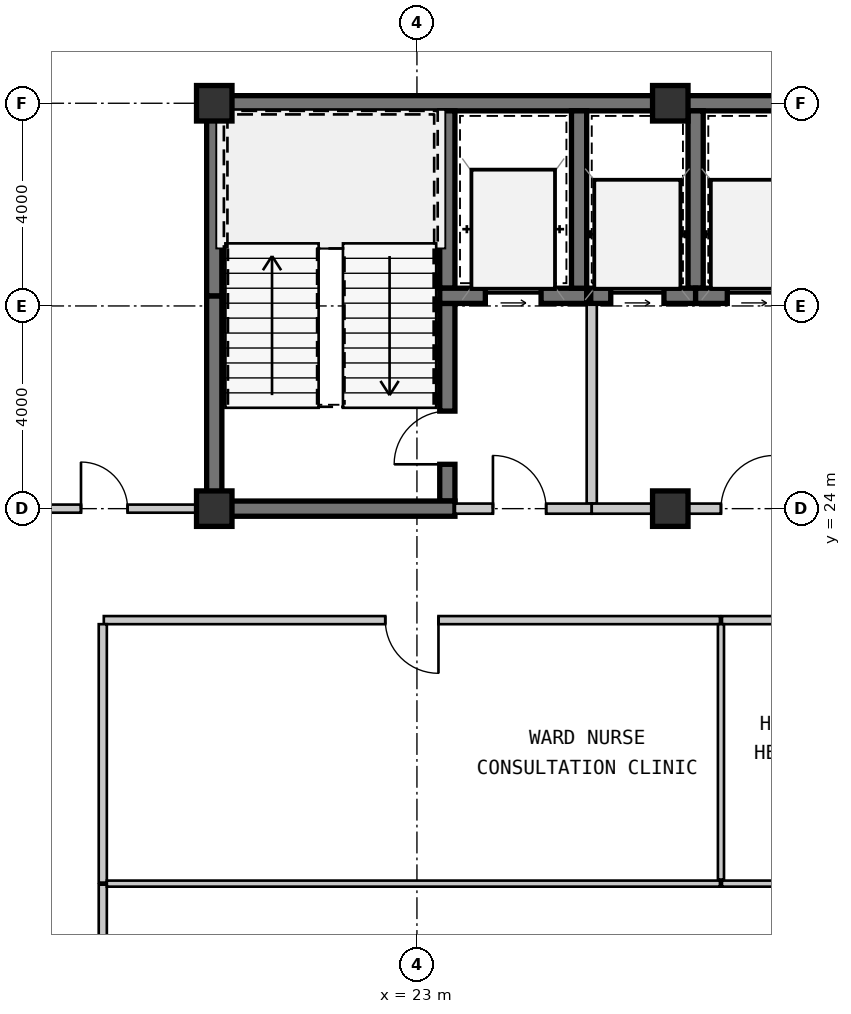
"""IFC4 building model, lengths in metres.
Left out: names, types, materials, properties, quantities, classifications, styles, units other than length and angle.
Written with IfcOpenShell. Run it as: python <this file> out.ifc"""

import sys

from ifc_helpers import new_model, si_unit, direction, frame, frame_2d, origin, origin_2d, place, context, subcontext, project, spatial, rectangle, extrude, source, transform, mapped, element, fill, save


model = new_model("IFC4")
c1 = context("Model", 3, precision=1e-05, world=origin(), true_north=direction((0.0, 1.0)))
c2 = subcontext(c1, "Body", "Model", "MODEL_VIEW")
j1 = project(units=[si_unit("LENGTHUNIT", "METRE"), si_unit("PLANEANGLEUNIT", "RADIAN")], contexts=[c1])
p1 = place(None, origin())
s1 = spatial("IfcSite", under=j1, at=p1, CompositionType="ELEMENT")
p2 = place(p1, origin())
s2 = spatial("IfcBuilding", under=s1, at=p2, CompositionType="ELEMENT")
p3 = place(p2, frame((0.0, 0.0, 87.15)))
s3 = spatial("IfcBuildingStorey", under=s2, at=p3, CompositionType="ELEMENT", Elevation=87.15)
m1 = source(origin(), c2, "Body", "SweptSolid", [
    extrude(rectangle(XDim=0.7, YDim=0.7, at=origin_2d()), origin(), (0.0, 0.0, 1.0), 3.15),
])
for number, where, z_axis, x_axis in (
    (1, (19.0, 24.0, 0.0), (0.0, 0.0, 1.0), (1.0, 0.0, 0.0)),
    (2, (28.0, 24.0, 0.0), (0.0, 0.0, 1.0), (1.0, 0.0, 0.0)),
    (3, (19.0, 32.0, 0.0), (0.0, 0.0, 1.0), (1.0, 0.0, 0.0)),
    (4, (28.0, 32.0, 0.0), (0.0, 0.0, 1.0), (1.0, 0.0, 0.0)),
):
    element("IfcColumn", number, at=place(p3, frame(where, z_axis=z_axis, x_axis=x_axis)), inside=s3, PredefinedType="COLUMN", context=c2, shape_type="MappedRepresentation", body=[
        mapped(m1, transform((0.0, 0.0, 0.0), scale=1.0)),
    ])
m2 = source(origin(), c2, "Body", "SweptSolid", [
    extrude(rectangle(XDim=9.15, YDim=0.3, at=frame_2d((4.575, 0.0))), origin(), (0.0, 0.0, 1.0), 2.93),
])
p4 = place(p3, frame((18.85, 32.0, 0.0), z_axis=(0.0, 0.0, 1.0), x_axis=(1.0, 0.0, 0.0)))
e5 = element("IfcWall", 5, at=p4, inside=s3, PredefinedType="SHEAR", context=c2, shape_type="MappedRepresentation", body=[
    mapped(m2, transform((0.0, 0.0, 0.0), scale=1.0)),
])
m3 = source(origin(), c2, "Body", "SweptSolid", [
    extrude(rectangle(XDim=11.2, YDim=0.3, at=frame_2d((5.6, 0.0))), origin(), (0.0, 0.0, 1.0), 2.93),
])
p5 = place(p3, frame((28.0, 32.0, 0.0), z_axis=(0.0, 0.0, 1.0), x_axis=(1.0, 0.0, 0.0)))
e6 = element("IfcWall", 6, at=p5, inside=s3, PredefinedType="SHEAR", context=c2, shape_type="MappedRepresentation", body=[
    mapped(m3, transform((0.0, 0.0, 0.0), scale=1.0)),
])
m4 = source(origin(), c2, "Body", "SweptSolid", [
    extrude(rectangle(XDim=4.05, YDim=0.3, at=frame_2d((2.025, 0.0))), origin(), (0.0, 0.0, 1.0), 2.93),
])
p6 = place(p3, frame((19.0, 24.15, 0.0), z_axis=(0.0, 0.0, 1.0), x_axis=(0.0, 1.0, 0.0)))
e7 = element("IfcWall", 7, at=p6, inside=s3, PredefinedType="SHEAR", context=c2, shape_type="MappedRepresentation", body=[
    mapped(m4, transform((0.0, 0.0, 0.0), scale=1.0)),
])
m5 = source(origin(), c2, "Body", "SweptSolid", [
    extrude(rectangle(XDim=3.65, YDim=0.3, at=frame_2d((1.825, 0.0))), origin(), (0.0, 0.0, 1.0), 2.93),
])
p7 = place(p3, frame((19.0, 28.2, 0.0), z_axis=(0.0, 0.0, 1.0), x_axis=(0.0, 1.0, 0.0)))
e8 = element("IfcWall", 8, at=p7, inside=s3, PredefinedType="SHEAR", context=c2, shape_type="MappedRepresentation", body=[
    mapped(m5, transform((0.0, 0.0, 0.0), scale=1.0)),
])
m6 = source(origin(), c2, "Body", "SweptSolid", [
    extrude(rectangle(XDim=3.5, YDim=0.3, at=frame_2d((1.75, 0.0))), origin(), (0.0, 0.0, 1.0), 2.93),
])
p8 = place(p3, frame((23.6, 28.35, 0.0), z_axis=(0.0, 0.0, 1.0), x_axis=(0.0, 1.0, 0.0)))
e9 = element("IfcWall", 9, at=p8, inside=s3, PredefinedType="SHEAR", context=c2, shape_type="MappedRepresentation", body=[
    mapped(m6, transform((0.0, 0.0, 0.0), scale=1.0)),
])
m7 = source(origin(), c2, "Body", "SweptSolid", [
    extrude(rectangle(XDim=3.9, YDim=0.3, at=frame_2d((1.95, 0.0))), origin(), (0.0, 0.0, 1.0), 2.93),
])
p9 = place(p3, frame((23.6, 24.15, 0.0), z_axis=(0.0, 0.0, 1.0), x_axis=(0.0, 1.0, 0.0)))
e10 = element("IfcWall", 10, at=p9, inside=s3, PredefinedType="SHEAR", context=c2, shape_type="MappedRepresentation", body=[
    mapped(m7, transform((0.0, 0.0, 0.0), scale=1.0)),
])
m8 = source(origin(), c2, "Body", "SweptSolid", [
    extrude(rectangle(XDim=1.05, YDim=2.1, at=frame_2d((0.525, 1.05))), frame((0.0, 0.16, 0.0), z_axis=(0.0, -1.0, 0.0), x_axis=(1.0, 0.0, 0.0)), (0.0, 0.0, 1.0), 0.32),
])
p10 = place(p9, frame((0.725, 0.0, 0.0)))
e11 = element("IfcOpeningElement", 11, at=p10, cuts=e10, PredefinedType="OPENING", context=c2, shape_type="MappedRepresentation", body=[
    mapped(m8, transform((0.0, 0.0, 0.0), scale=1.0)),
])
m9 = source(origin(), c2, "Body", "SweptSolid", [
    extrude(rectangle(XDim=4.9, YDim=0.3, at=frame_2d((2.45, 0.0))), origin(), (0.0, 0.0, 1.0), 2.93),
])
p11 = place(p3, frame((18.85, 24.0, 0.0), z_axis=(0.0, 0.0, 1.0), x_axis=(1.0, 0.0, 0.0)))
e12 = element("IfcWall", 12, at=p11, inside=s3, PredefinedType="SHEAR", context=c2, shape_type="MappedRepresentation", body=[
    mapped(m9, transform((0.0, 0.0, 0.0), scale=1.0)),
])
m10 = source(origin(), c2, "Body", "SweptSolid", [
    extrude(rectangle(XDim=2.9, YDim=0.3, at=frame_2d((1.45, 0.0))), origin(), (0.0, 0.0, 1.0), 2.93),
])
p12 = place(p3, frame((23.45, 28.2, 0.0), z_axis=(0.0, 0.0, 1.0), x_axis=(1.0, 0.0, 0.0)))
e13 = element("IfcWall", 13, at=p12, inside=s3, PredefinedType="SHEAR", context=c2, shape_type="MappedRepresentation", body=[
    mapped(m10, transform((0.0, 0.0, 0.0), scale=1.0)),
])
m11 = source(origin(), c2, "Body", "SweptSolid", [
    extrude(rectangle(XDim=1.1, YDim=2.15, at=frame_2d((0.55, 1.075))), frame((0.0, 0.16, 0.0), z_axis=(0.0, -1.0, 0.0), x_axis=(1.0, 0.0, 0.0)), (0.0, 0.0, 1.0), 0.32),
])
p13 = place(p12, frame((0.9, 0.0, 0.0)))
e14 = element("IfcOpeningElement", 14, at=p13, cuts=e13, PredefinedType="OPENING", context=c2, shape_type="MappedRepresentation", body=[
    mapped(m11, transform((0.0, 0.0, 0.0), scale=1.0)),
])
p14 = place(p3, frame((26.2, 28.35, 0.0), z_axis=(0.0, 0.0, 1.0), x_axis=(0.0, 1.0, 0.0)))
e15 = element("IfcWall", 15, at=p14, inside=s3, PredefinedType="SHEAR", context=c2, shape_type="MappedRepresentation", body=[
    mapped(m6, transform((0.0, 0.0, 0.0), scale=1.0)),
])
m12 = source(origin(), c2, "Body", "SweptSolid", [
    extrude(rectangle(XDim=3.95, YDim=0.2, at=frame_2d((1.975, 0.0))), origin(), (0.0, 0.0, 1.0), 2.93),
])
p15 = place(p3, frame((26.45, 24.1, 0.0), z_axis=(0.0, 0.0, 1.0), x_axis=(0.0, 1.0, 0.0)))
e16 = element("IfcWall", 16, at=p15, inside=s3, PredefinedType="SOLIDWALL", context=c2, shape_type="MappedRepresentation", body=[
    mapped(m12, transform((0.0, 0.0, 0.0), scale=1.0)),
])
m13 = source(origin(), c2, "Body", "SweptSolid", [
    extrude(rectangle(XDim=2.7, YDim=0.2, at=frame_2d((1.35, 0.0))), origin(), (0.0, 0.0, 1.0), 2.47),
])
p16 = place(p3, frame((23.75, 24.0, 0.0), z_axis=(0.0, 0.0, 1.0), x_axis=(1.0, 0.0, 0.0)))
e17 = element("IfcWall", 17, at=p16, inside=s3, PredefinedType="SOLIDWALL", context=c2, shape_type="MappedRepresentation", body=[
    mapped(m13, transform((0.0, 0.0, 0.0), scale=1.0)),
])
m14 = source(origin(), c2, "Body", "SweptSolid", [
    extrude(rectangle(XDim=1.05, YDim=2.1, at=frame_2d((0.525, 1.05))), frame((0.0, 0.11, 0.0), z_axis=(0.0, -1.0, 0.0), x_axis=(1.0, 0.0, 0.0)), (0.0, 0.0, 1.0), 0.22),
])
p17 = place(p16, frame((0.75, 0.0, 0.0)))
e18 = element("IfcOpeningElement", 18, at=p17, cuts=e17, PredefinedType="OPENING", context=c2, shape_type="MappedRepresentation", body=[
    mapped(m14, transform((0.0, 0.0, 0.0), scale=1.0)),
])
p18 = place(p3, frame((28.5, 28.35, 0.0), z_axis=(0.0, 0.0, 1.0), x_axis=(0.0, 1.0, 0.0)))
e19 = element("IfcWall", 19, at=p18, inside=s3, PredefinedType="SHEAR", context=c2, shape_type="MappedRepresentation", body=[
    mapped(m6, transform((0.0, 0.0, 0.0), scale=1.0)),
])
m15 = source(origin(), c2, "Body", "SweptSolid", [
    extrude(rectangle(XDim=2.07, YDim=0.3, at=frame_2d((1.035, 0.0))), origin(), (0.0, 0.0, 1.0), 2.93),
])
p19 = place(p3, frame((26.43, 28.2, 0.0), z_axis=(0.0, 0.0, 1.0), x_axis=(1.0, 0.0, 0.0)))
e20 = element("IfcWall", 20, at=p19, inside=s3, PredefinedType="SHEAR", context=c2, shape_type="MappedRepresentation", body=[
    mapped(m15, transform((0.0, 0.0, 0.0), scale=1.0)),
])
m16 = source(origin(), c2, "Body", "SweptSolid", [
    extrude(rectangle(XDim=1.05, YDim=2.15, at=frame_2d((0.525, 1.075))), frame((0.0, 0.16, 0.0), z_axis=(0.0, -1.0, 0.0), x_axis=(1.0, 0.0, 0.0)), (0.0, 0.0, 1.0), 0.32),
])
p20 = place(p19, frame((0.395, 0.0, 0.0)))
e21 = element("IfcOpeningElement", 21, at=p20, cuts=e20, PredefinedType="OPENING", context=c2, shape_type="MappedRepresentation", body=[
    mapped(m16, transform((0.0, 0.0, 0.0), scale=1.0)),
])
m17 = source(origin(), c2, "Body", "SweptSolid", [
    extrude(rectangle(XDim=2.45, YDim=0.3, at=frame_2d((1.225, 0.0))), origin(), (0.0, 0.0, 1.0), 2.93),
])
p21 = place(p3, frame((28.5, 28.2, 0.0), z_axis=(0.0, 0.0, 1.0), x_axis=(1.0, 0.0, 0.0)))
e22 = element("IfcWall", 22, at=p21, inside=s3, PredefinedType="SHEAR", context=c2, shape_type="MappedRepresentation", body=[
    mapped(m17, transform((0.0, 0.0, 0.0), scale=1.0)),
])
p22 = place(p21, frame((0.625, 0.0, 0.0)))
e23 = element("IfcOpeningElement", 23, at=p22, cuts=e22, PredefinedType="OPENING", context=c2, shape_type="MappedRepresentation", body=[
    mapped(m16, transform((0.0, 0.0, 0.0), scale=1.0)),
])
m18 = source(origin(), c2, "Body", "SweptSolid", [
    extrude(rectangle(XDim=4.35, YDim=0.2, at=frame_2d((2.175, 0.0))), origin(), (0.0, 0.0, 1.0), 2.47),
])
p23 = place(p3, frame((30.8, 24.0, 0.0), z_axis=(0.0, 0.0, 1.0), x_axis=(-1.0, 0.0, 0.0)))
e24 = element("IfcWall", 24, at=p23, inside=s3, PredefinedType="SOLIDWALL", context=c2, shape_type="MappedRepresentation", body=[
    mapped(m18, transform((0.0, 0.0, 0.0), scale=1.0)),
])
p24 = place(p23, frame((0.75, 0.0, 0.0)))
e25 = element("IfcOpeningElement", 25, at=p24, cuts=e24, PredefinedType="OPENING", context=c2, shape_type="MappedRepresentation", body=[
    mapped(m14, transform((0.0, 0.0, 0.0), scale=1.0)),
])
m19 = source(origin(), c2, "Body", "SweptSolid", [
    extrude(rectangle(XDim=5.16, YDim=0.16, at=frame_2d((2.58, 0.0))), origin(), (0.0, 0.0, 1.0), 2.93),
])
p25 = place(p3, frame((16.8, 16.58, 0.0), z_axis=(0.0, 0.0, 1.0), x_axis=(0.0, -1.0, 0.0)))
e26 = element("IfcWall", 26, at=p25, inside=s3, PredefinedType="PARTITIONING", context=c2, shape_type="MappedRepresentation", body=[
    mapped(m19, transform((0.0, 0.0, 0.0), scale=1.0)),
])
m20 = source(origin(), c2, "Body", "SweptSolid", [
    extrude(rectangle(XDim=12.159, YDim=0.16, at=frame_2d((6.08, 0.0))), origin(), (0.0, 0.0, 1.0), 2.93),
])
p26 = place(p3, frame((28.98, 21.8, 0.0), z_axis=(0.0, 0.0, 1.0), x_axis=(-1.0, 0.0, 0.0)))
e27 = element("IfcWall", 27, at=p26, inside=s3, PredefinedType="PARTITIONING", context=c2, shape_type="MappedRepresentation", body=[
    mapped(m20, transform((0.0, 0.0, 0.0), scale=1.0)),
])
m21 = source(origin(), c2, "Body", "SweptSolid", [
    extrude(rectangle(XDim=1.05, YDim=2.1, at=frame_2d((0.525, 1.05))), frame((0.0, 0.09, 0.0), z_axis=(0.0, -1.0, 0.0), x_axis=(1.0, 0.0, 0.0)), (0.0, 0.0, 1.0), 0.18),
])
p27 = place(p26, frame((5.555, 0.0, 0.0)))
e28 = element("IfcOpeningElement", 28, at=p27, cuts=e27, PredefinedType="OPENING", context=c2, shape_type="MappedRepresentation", body=[
    mapped(m21, transform((0.0, 0.0, 0.0), scale=1.0)),
])
m22 = source(origin(), c2, "Body", "SweptSolid", [
    extrude(rectangle(XDim=5.1, YDim=0.16, at=frame_2d((2.55, 0.0))), origin(), (0.0, 0.0, 1.0), 2.93),
])
p28 = place(p3, frame((16.8, 21.72, 0.0), z_axis=(0.0, 0.0, 1.0), x_axis=(0.0, -1.0, 0.0)))
e29 = element("IfcWall", 29, at=p28, inside=s3, PredefinedType="PARTITIONING", context=c2, shape_type="MappedRepresentation", body=[
    mapped(m22, transform((0.0, 0.0, 0.0), scale=1.0)),
])
m23 = source(origin(), c2, "Body", "SweptSolid", [
    extrude(rectangle(XDim=24.159, YDim=0.16, at=frame_2d((12.08, 0.0))), origin(), (0.0, 0.0, 1.0), 2.93),
])
p29 = place(p3, frame((53.18, 21.8, 0.0), z_axis=(0.0, 0.0, 1.0), x_axis=(-1.0, 0.0, 0.0)))
e30 = element("IfcWall", 30, at=p29, inside=s3, PredefinedType="PARTITIONING", context=c2, shape_type="MappedRepresentation", body=[
    mapped(m23, transform((0.0, 0.0, 0.0), scale=1.0)),
])
m24 = source(origin(), c2, "Body", "SweptSolid", [
    extrude(rectangle(XDim=0.92, YDim=2.1, at=frame_2d((0.46, 1.05))), frame((0.0, 0.09, 0.0), z_axis=(0.0, -1.0, 0.0), x_axis=(1.0, 0.0, 0.0)), (0.0, 0.0, 1.0), 0.18),
])
p30 = place(p29, frame((11.62, 0.0, 0.0)))
e31 = element("IfcOpeningElement", 31, at=p30, cuts=e30, PredefinedType="OPENING", context=c2, shape_type="MappedRepresentation", body=[
    mapped(m24, transform((0.0, 0.0, 0.0), scale=1.0)),
])
m25 = source(origin(), c2, "Body", "SweptSolid", [
    extrude(rectangle(XDim=4.17, YDim=0.16, at=frame_2d((2.085, 0.0))), origin(), (0.0, 0.0, 1.0), 2.93),
])
p31 = place(p3, frame((14.68, 24.0, 0.0), z_axis=(0.0, 0.0, 1.0), x_axis=(1.0, 0.0, 0.0)))
e32 = element("IfcWall", 32, at=p31, inside=s3, PredefinedType="PARTITIONING", context=c2, shape_type="MappedRepresentation", body=[
    mapped(m25, transform((0.0, 0.0, 0.0), scale=1.0)),
])
p32 = place(p31, frame((1.69, 0.0, 0.0)))
e33 = element("IfcOpeningElement", 33, at=p32, cuts=e32, PredefinedType="OPENING", context=c2, shape_type="MappedRepresentation", body=[
    mapped(m24, transform((0.0, 0.0, 0.0), scale=1.0)),
])
m26 = source(origin(), c2, "Body", "SweptSolid", [
    extrude(rectangle(XDim=12.1, YDim=0.12, at=frame_2d((6.05, 0.0))), origin(), (0.0, 0.0, 1.0), 2.93),
])
p33 = place(p3, frame((16.88, 16.6, 0.0), z_axis=(0.0, 0.0, 1.0), x_axis=(1.0, 0.0, 0.0)))
e34 = element("IfcWall", 34, at=p33, inside=s3, PredefinedType="PARTITIONING", context=c2, shape_type="MappedRepresentation", body=[
    mapped(m26, transform((0.0, 0.0, 0.0), scale=1.0)),
])
m27 = source(origin(), c2, "Body", "SweptSolid", [
    extrude(rectangle(XDim=11.9, YDim=0.12, at=frame_2d((5.95, 0.0))), origin(), (0.0, 0.0, 1.0), 2.93),
])
p34 = place(p3, frame((29.02, 16.6, 0.0), z_axis=(0.0, 0.0, 1.0), x_axis=(1.0, 0.0, 0.0)))
e35 = element("IfcWall", 35, at=p34, inside=s3, PredefinedType="PARTITIONING", context=c2, shape_type="MappedRepresentation", body=[
    mapped(m27, transform((0.0, 0.0, 0.0), scale=1.0)),
])
m28 = source(origin(), c2, "Body", "SweptSolid", [
    extrude(rectangle(XDim=5.04, YDim=0.12, at=frame_2d((2.52, 0.0))), origin(), (0.0, 0.0, 1.0), 2.93),
])
p35 = place(p3, frame((29.0, 21.72, 0.0), z_axis=(0.0, 0.0, 1.0), x_axis=(0.0, -1.0, 0.0)))
e36 = element("IfcWall", 36, at=p35, inside=s3, PredefinedType="PARTITIONING", context=c2, shape_type="MappedRepresentation", body=[
    mapped(m28, transform((0.0, 0.0, 0.0), scale=1.0)),
])
m29 = source(origin(), c2, "Body", "SweptSolid", [
    extrude(rectangle(XDim=1.05, YDim=2.1, at=frame_2d((0.525, 1.05))), frame((0.0, 0.025, 0.0), z_axis=(0.0, -1.0, 0.0), x_axis=(1.0, 0.0, 0.0)), (0.0, 0.0, 1.0), 0.05),
])
p36 = place(p10, origin())
e37 = element("IfcDoor", 37, at=p36, inside=s3, OperationType="SINGLE_SWING_LEFT", PredefinedType="DOOR", context=c2, shape_type="MappedRepresentation", body=[
    mapped(m29, transform((0.0, 0.0, 0.0), scale=1.0)),
])
fill(e11, e37)
m30 = source(origin(), c2, "Body", "SweptSolid", [
    extrude(rectangle(XDim=1.1, YDim=2.15, at=frame_2d((0.55, 1.075))), frame((0.0, 0.025, 0.0), z_axis=(0.0, -1.0, 0.0), x_axis=(1.0, 0.0, 0.0)), (0.0, 0.0, 1.0), 0.05),
])
p37 = place(p13, origin())
e38 = element("IfcDoor", 38, at=p37, inside=s3, OperationType="SLIDING_TO_LEFT", PredefinedType="DOOR", context=c2, shape_type="MappedRepresentation", body=[
    mapped(m30, transform((0.0, 0.0, 0.0), scale=1.0)),
])
fill(e14, e38)
p38 = place(p17, origin())
e39 = element("IfcDoor", 39, at=p38, inside=s3, OperationType="SINGLE_SWING_LEFT", PredefinedType="DOOR", context=c2, shape_type="MappedRepresentation", body=[
    mapped(m29, transform((0.0, 0.0, 0.0), scale=1.0)),
])
fill(e18, e39)
m31 = source(origin(), c2, "Body", "SweptSolid", [
    extrude(rectangle(XDim=1.05, YDim=2.15, at=frame_2d((0.525, 1.075))), frame((0.0, 0.025, 0.0), z_axis=(0.0, -1.0, 0.0), x_axis=(1.0, 0.0, 0.0)), (0.0, 0.0, 1.0), 0.05),
])
p39 = place(p20, origin())
e40 = element("IfcDoor", 40, at=p39, inside=s3, OperationType="SLIDING_TO_LEFT", PredefinedType="DOOR", context=c2, shape_type="MappedRepresentation", body=[
    mapped(m31, transform((0.0, 0.0, 0.0), scale=1.0)),
])
fill(e21, e40)
p40 = place(p22, origin())
e41 = element("IfcDoor", 41, at=p40, inside=s3, OperationType="SLIDING_TO_LEFT", PredefinedType="DOOR", context=c2, shape_type="MappedRepresentation", body=[
    mapped(m31, transform((0.0, 0.0, 0.0), scale=1.0)),
])
fill(e23, e41)
p41 = place(p24, frame((1.05, 0.0, 0.0), z_axis=(0.0, 0.0, 1.0), x_axis=(-1.0, 0.0, 0.0)))
e42 = element("IfcDoor", 42, at=p41, inside=s3, OperationType="SINGLE_SWING_RIGHT", PredefinedType="DOOR", context=c2, shape_type="MappedRepresentation", body=[
    mapped(m29, transform((0.0, 0.0, 0.0), scale=1.0)),
])
fill(e25, e42)
p42 = place(p27, origin())
e43 = element("IfcDoor", 43, at=p42, inside=s3, OperationType="SINGLE_SWING_LEFT", PredefinedType="DOOR", context=c2, shape_type="MappedRepresentation", body=[
    mapped(m29, transform((0.0, 0.0, 0.0), scale=1.0)),
])
fill(e28, e43)
m32 = source(origin(), c2, "Body", "SweptSolid", [
    extrude(rectangle(XDim=0.92, YDim=2.1, at=frame_2d((0.46, 1.05))), frame((0.0, 0.025, 0.0), z_axis=(0.0, -1.0, 0.0), x_axis=(1.0, 0.0, 0.0)), (0.0, 0.0, 1.0), 0.05),
])
p43 = place(p32, origin())
e44 = element("IfcDoor", 44, at=p43, inside=s3, OperationType="SINGLE_SWING_LEFT", PredefinedType="DOOR", context=c2, shape_type="MappedRepresentation", body=[
    mapped(m32, transform((0.0, 0.0, 0.0), scale=1.0)),
])
fill(e33, e44)
save(model, sys.argv[1])
